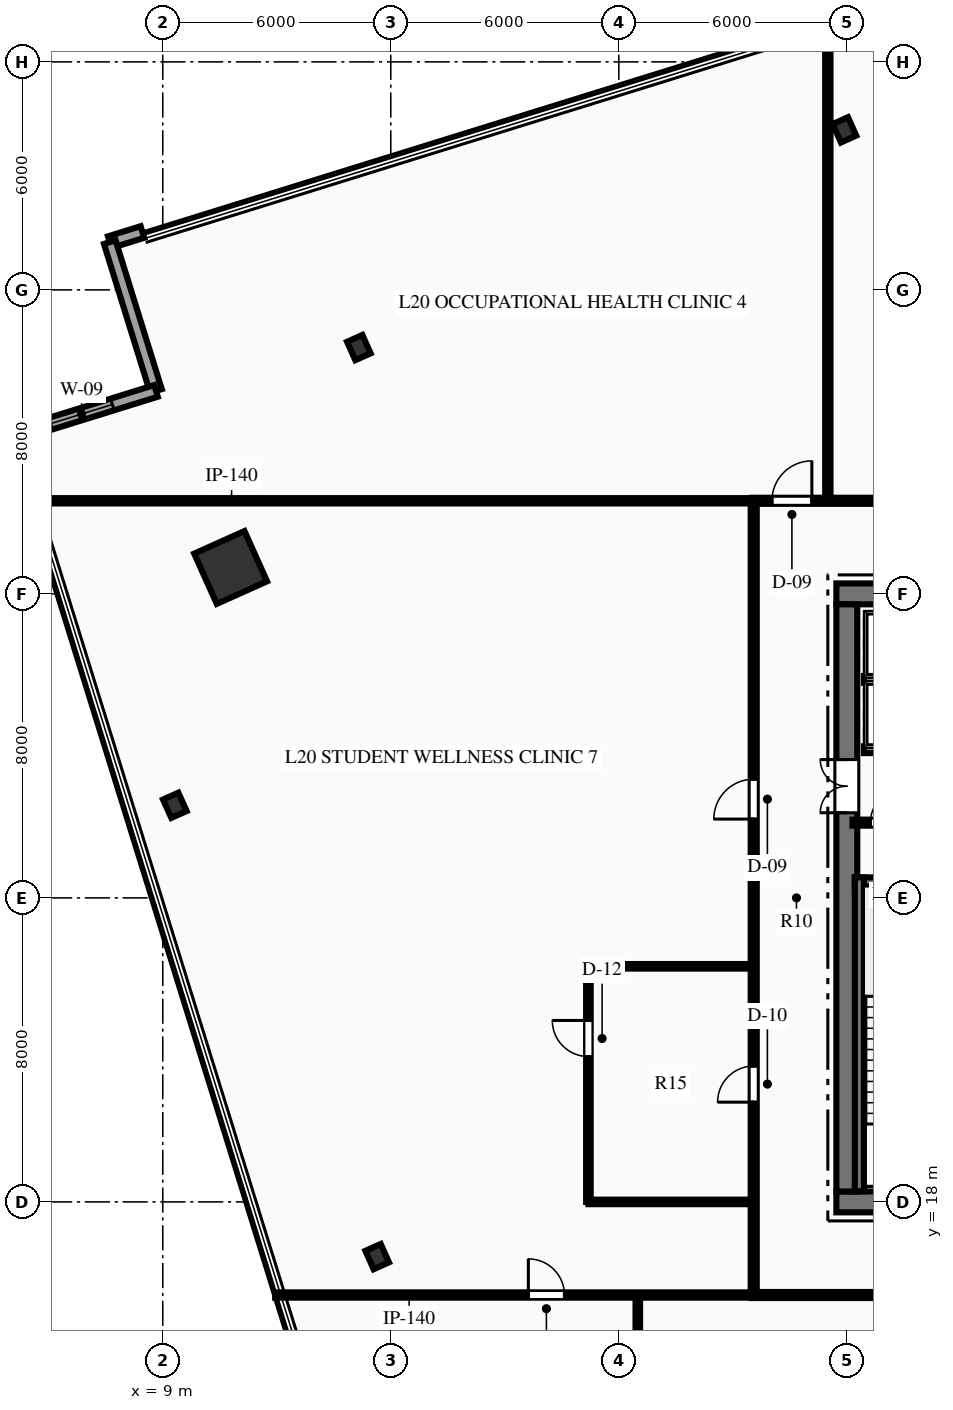
"""IFC4 building model, lengths in metres.
Left out: names, types, materials, properties, quantities, classifications, styles, units other than length and angle.
Written with IfcOpenShell. Run it as: python <this file> out.ifc"""

import sys

from ifc_helpers import new_model, si_unit, direction, frame, frame_2d, origin, origin_2d, place, context, subcontext, project, spatial, rectangle, hollow_rectangle, i_section, extrude, element, fill, save


model = new_model("IFC4")
c1 = context("Model", 3, precision=1e-05, world=origin(), true_north=direction((0.0, 1.0)))
c2 = subcontext(c1, "Body", "Model", "MODEL_VIEW")
j1 = project(units=[si_unit("LENGTHUNIT", "METRE"), si_unit("PLANEANGLEUNIT", "RADIAN")], contexts=[c1])
p1 = place(None, origin())
s1 = spatial("IfcSite", under=j1, at=p1, CompositionType="ELEMENT")
p2 = place(p1, origin())
s2 = spatial("IfcBuilding", under=s1, at=p2, CompositionType="ELEMENT")
p3 = place(p2, frame((0.0, 0.0, 85.95)))
s3 = spatial("IfcBuildingStorey", under=s2, at=p3, CompositionType="ELEMENT", Elevation=85.95)
p4 = place(p3, frame((26.725, 18.0, 0.0), z_axis=(0.0, 0.0, 1.0), x_axis=(1.0, 0.0, 0.0)))
e1 = element("IfcWall", 1, at=p4, inside=s3, PredefinedType="SHEAR", context=c2, shape_type="SweptSolid", body=[
    extrude(rectangle(XDim=18.55, YDim=0.55, at=frame_2d((9.275, 0.0))), origin(), (0.0, 0.0, 1.0), 4.5),
])
p5 = place(p4, frame((7.375, 0.0, 0.0)))
e2 = element("IfcOpeningElement", 2, at=p5, cuts=e1, PredefinedType="OPENING", context=c2, shape_type="SweptSolid", body=[
    extrude(rectangle(XDim=1.1, YDim=2.15, at=frame_2d((0.55, 1.075))), frame((0.0, 0.285, 0.0), z_axis=(0.0, -1.0, 0.0), x_axis=(1.0, 0.0, 0.0)), (0.0, 0.0, 1.0), 0.57),
])
p6 = place(p4, frame((10.075, 0.0, 0.0)))
e3 = element("IfcOpeningElement", 3, at=p6, cuts=e1, PredefinedType="OPENING", context=c2, shape_type="SweptSolid", body=[
    extrude(rectangle(XDim=1.1, YDim=2.15, at=frame_2d((0.55, 1.075))), frame((0.0, 0.285, 0.0), z_axis=(0.0, -1.0, 0.0), x_axis=(1.0, 0.0, 0.0)), (0.0, 0.0, 1.0), 0.57),
])
p7 = place(p3, frame((26.725, 34.0, 0.0), z_axis=(0.0, 0.0, 1.0), x_axis=(1.0, 0.0, 0.0)))
e4 = element("IfcWall", 4, at=p7, inside=s3, PredefinedType="SHEAR", context=c2, shape_type="SweptSolid", body=[
    extrude(rectangle(XDim=18.55, YDim=0.55, at=frame_2d((9.275, 0.0))), origin(), (0.0, 0.0, 1.0), 4.5),
])
p8 = place(p7, frame((1.24, 0.0, 0.0)))
e5 = element("IfcOpeningElement", 5, at=p8, cuts=e4, PredefinedType="OPENING", context=c2, shape_type="SweptSolid", body=[
    extrude(rectangle(XDim=1.1, YDim=2.15, at=frame_2d((0.55, 1.075))), frame((0.0, 0.285, 0.0), z_axis=(0.0, -1.0, 0.0), x_axis=(1.0, 0.0, 0.0)), (0.0, 0.0, 1.0), 0.57),
])
p9 = place(p7, frame((3.49, 0.0, 0.0)))
e6 = element("IfcOpeningElement", 6, at=p9, cuts=e4, PredefinedType="OPENING", context=c2, shape_type="SweptSolid", body=[
    extrude(rectangle(XDim=1.1, YDim=2.15, at=frame_2d((0.55, 1.075))), frame((0.0, 0.285, 0.0), z_axis=(0.0, -1.0, 0.0), x_axis=(1.0, 0.0, 0.0)), (0.0, 0.0, 1.0), 0.57),
])
p10 = place(p7, frame((13.96, 0.0, 0.0)))
e7 = element("IfcOpeningElement", 7, at=p10, cuts=e4, PredefinedType="OPENING", context=c2, shape_type="SweptSolid", body=[
    extrude(rectangle(XDim=1.1, YDim=2.15, at=frame_2d((0.55, 1.075))), frame((0.0, 0.285, 0.0), z_axis=(0.0, -1.0, 0.0), x_axis=(1.0, 0.0, 0.0)), (0.0, 0.0, 1.0), 0.57),
])
p11 = place(p7, frame((16.21, 0.0, 0.0)))
e8 = element("IfcOpeningElement", 8, at=p11, cuts=e4, PredefinedType="OPENING", context=c2, shape_type="SweptSolid", body=[
    extrude(rectangle(XDim=1.1, YDim=2.15, at=frame_2d((0.55, 1.075))), frame((0.0, 0.285, 0.0), z_axis=(0.0, -1.0, 0.0), x_axis=(1.0, 0.0, 0.0)), (0.0, 0.0, 1.0), 0.57),
])
p12 = place(p3, frame((27.0, 18.275, 0.0), z_axis=(0.0, 0.0, 1.0), x_axis=(0.0, 1.0, 0.0)))
e9 = element("IfcWall", 9, at=p12, inside=s3, PredefinedType="SHEAR", context=c2, shape_type="SweptSolid", body=[
    extrude(rectangle(XDim=15.45, YDim=0.55, at=frame_2d((7.725, 0.0))), origin(), (0.0, 0.0, 1.0), 4.5),
])
p13 = place(p12, frame((9.965, 0.0, 0.0)))
e10 = element("IfcOpeningElement", 10, at=p13, cuts=e9, PredefinedType="OPENING", context=c2, shape_type="SweptSolid", body=[
    extrude(rectangle(XDim=1.4, YDim=2.2, at=frame_2d((0.7, 1.1))), frame((0.0, 0.285, 0.0), z_axis=(0.0, -1.0, 0.0), x_axis=(1.0, 0.0, 0.0)), (0.0, 0.0, 1.0), 0.57),
])
p14 = place(p3, frame((27.21, 26.42, 0.0), z_axis=(0.0, 0.0, 1.0), x_axis=(1.0, 0.0, 0.0)))
e11 = element("IfcWall", 11, at=p14, inside=s3, PredefinedType="SHEAR", context=c2, shape_type="SweptSolid", body=[
    extrude(rectangle(XDim=3.98, YDim=0.24, at=frame_2d((1.99, 0.0))), origin(), (0.0, 0.0, 1.0), 4.5),
])
p15 = place(p3, frame((27.33, 18.28, 0.0), z_axis=(0.0, 0.0, 1.0), x_axis=(0.0, 1.0, 0.0)))
e12 = element("IfcWall", 12, at=p15, inside=s3, PredefinedType="SHEAR", context=c2, shape_type="SweptSolid", body=[
    extrude(rectangle(XDim=8.26, YDim=0.24, at=frame_2d((4.13, 0.0))), origin(), (0.0, 0.0, 1.0), 4.5),
])
p16 = place(p3, frame((10.786, 34.695, 0.0), z_axis=(0.0, 0.0, 1.0), x_axis=(0.912477494148, 0.409126902895, 0.0)))
e13 = element("IfcColumn", 13, at=p16, inside=s3, PredefinedType="COLUMN", context=c2, shape_type="SweptSolid", body=[
    extrude(hollow_rectangle(XDim=1.45, YDim=1.45, WallThickness=0.07, at=origin_2d()), origin(), (0.0, 0.0, 1.0), 4.5),
])
for number, where, z_axis, x_axis in (
    (14, (26.938, 46.211, 0.0), (0.0, 0.0, 1.0), (0.912, 0.409, 0.0)),
    (15, (14.159, 40.482, 0.0), (0.0, 0.0, 1.0), (0.912, 0.409, 0.0)),
    (16, (9.318, 28.437, 0.0), (0.0, 0.0, 1.0), (0.912, 0.409, 0.0)),
    (17, (14.643, 16.561, 0.0), (0.0, 0.0, 1.0), (0.912, 0.409, 0.0)),
):
    element("IfcColumn", number, at=place(p3, frame(where, z_axis=z_axis, x_axis=x_axis)), inside=s3, PredefinedType="COLUMN", context=c2, shape_type="SweptSolid", body=[
        extrude(i_section(OverallWidth=0.442, OverallDepth=0.531, WebThickness=0.066, FlangeThickness=0.106, at=origin_2d()), origin(), (0.0, 0.0, 1.0), 4.5),
    ])
p17 = place(p3, frame((7.606, 43.256, 0.0), z_axis=(0.0, 0.0, 1.0), x_axis=(0.955019103262, 0.296544284053, 0.0)))
e18 = element("IfcWall", 18, at=p17, inside=s3, PredefinedType="STANDARD", context=c2, shape_type="SweptSolid", body=[
    extrude(rectangle(XDim=0.9, YDim=0.32, at=frame_2d((0.45, 0.0))), origin(), (0.0, 0.0, 1.0), 4.2),
])
p18 = place(p3, frame((8.822, 39.341, 0.0), z_axis=(0.0, 0.0, 1.0), x_axis=(-0.296545302379, 0.95501878706, 0.0)))
e19 = element("IfcWall", 19, at=p18, inside=s3, PredefinedType="STANDARD", context=c2, shape_type="SweptSolid", body=[
    extrude(rectangle(XDim=4.1, YDim=0.32, at=frame_2d((2.05, 0.0))), origin(), (0.0, 0.0, 1.0), 4.2),
])
p19 = place(p3, frame((4.906, 38.125, 0.0), z_axis=(0.0, 0.0, 1.0), x_axis=(0.95501878706, 0.296545302379, 0.0)))
e20 = element("IfcWall", 20, at=p19, inside=s3, PredefinedType="STANDARD", context=c2, shape_type="SweptSolid", body=[
    extrude(rectangle(XDim=4.1, YDim=0.32, at=frame_2d((2.05, 0.0))), origin(), (0.0, 0.0, 1.0), 4.2),
])
p20 = place(p19, frame((1.2, 0.0, 0.75)))
e21 = element("IfcOpeningElement", 21, at=p20, cuts=e20, PredefinedType="OPENING", context=c2, shape_type="SweptSolid", body=[
    extrude(rectangle(XDim=1.7, YDim=2.5, at=frame_2d((0.85, 1.25))), frame((0.0, 0.17, 0.0), z_axis=(0.0, -1.0, 0.0), x_axis=(1.0, 0.0, 0.0)), (0.0, 0.0, 1.0), 0.34),
])
p21 = place(p3, frame((27.15, 27.98, 0.0), z_axis=(0.0, 0.0, 1.0), x_axis=(1.0, 0.0, 0.0)))
e22 = element("IfcWall", 22, at=p21, inside=s3, PredefinedType="PARTITIONING", context=c2, shape_type="SweptSolid", body=[
    extrude(rectangle(XDim=4.05, YDim=0.16, at=frame_2d((2.025, 0.0))), origin(), (0.0, 0.0, 1.0), 4.2),
])
p22 = place(p21, frame((0.47, 0.0, 0.0)))
e23 = element("IfcOpeningElement", 23, at=p22, cuts=e22, PredefinedType="OPENING", context=c2, shape_type="SweptSolid", body=[
    extrude(rectangle(XDim=0.9, YDim=2.15, at=frame_2d((0.45, 1.075))), frame((0.0, 0.09, 0.0), z_axis=(0.0, -1.0, 0.0), x_axis=(1.0, 0.0, 0.0)), (0.0, 0.0, 1.0), 0.18),
])
p23 = place(p21, frame((2.36, 0.0, 0.0)))
e24 = element("IfcOpeningElement", 24, at=p23, cuts=e22, PredefinedType="OPENING", context=c2, shape_type="SweptSolid", body=[
    extrude(rectangle(XDim=0.9, YDim=2.15, at=frame_2d((0.45, 1.075))), frame((0.0, 0.09, 0.0), z_axis=(0.0, -1.0, 0.0), x_axis=(1.0, 0.0, 0.0)), (0.0, 0.0, 1.0), 0.18),
])
p24 = place(p3, frame((27.45, 29.9, 0.0), z_axis=(0.0, 0.0, 1.0), x_axis=(1.0, 0.0, 0.0)))
e25 = element("IfcWall", 25, at=p24, inside=s3, PredefinedType="PARTITIONING", context=c2, shape_type="SweptSolid", body=[
    extrude(rectangle(XDim=4.43, YDim=0.18, at=frame_2d((2.215, 0.0))), origin(), (0.0, 0.0, 1.0), 4.2),
])
p25 = place(p24, frame((0.515, 0.0, 0.0)))
e26 = element("IfcOpeningElement", 26, at=p25, cuts=e25, PredefinedType="OPENING", context=c2, shape_type="SweptSolid", body=[
    extrude(rectangle(XDim=1.1, YDim=2.15, at=frame_2d((0.55, 1.075))), frame((0.0, 0.1, 0.0), z_axis=(0.0, -1.0, 0.0), x_axis=(1.0, 0.0, 0.0)), (0.0, 0.0, 1.0), 0.2),
])
p26 = place(p24, frame((2.765, 0.0, 0.0)))
e27 = element("IfcOpeningElement", 27, at=p26, cuts=e25, PredefinedType="OPENING", context=c2, shape_type="SweptSolid", body=[
    extrude(rectangle(XDim=1.1, YDim=2.15, at=frame_2d((0.55, 1.075))), frame((0.0, 0.1, 0.0), z_axis=(0.0, -1.0, 0.0), x_axis=(1.0, 0.0, 0.0)), (0.0, 0.0, 1.0), 0.2),
])
p27 = place(p3, frame((27.45, 31.75, 0.0), z_axis=(0.0, 0.0, 1.0), x_axis=(1.0, 0.0, 0.0)))
e28 = element("IfcWall", 28, at=p27, inside=s3, PredefinedType="PARTITIONING", context=c2, shape_type="SweptSolid", body=[
    extrude(rectangle(XDim=4.43, YDim=0.18, at=frame_2d((2.215, 0.0))), origin(), (0.0, 0.0, 1.0), 4.2),
])
p28 = place(p3, frame((24.5, 15.55, 0.0), z_axis=(0.0, 0.0, 1.0), x_axis=(1.0, 0.0, 0.0)))
e29 = element("IfcWall", 29, at=p28, inside=s3, PredefinedType="PARTITIONING", context=c2, shape_type="SweptSolid", body=[
    extrude(rectangle(XDim=23.0, YDim=0.16, at=frame_2d((11.5, 0.0))), origin(), (0.0, 0.0, 1.0), 4.2),
])
p29 = place(p28, frame((16.15, 0.0, 0.0)))
e30 = element("IfcOpeningElement", 30, at=p29, cuts=e29, PredefinedType="OPENING", context=c2, shape_type="SweptSolid", body=[
    extrude(rectangle(XDim=0.9, YDim=2.15, at=frame_2d((0.45, 1.075))), frame((0.0, 0.09, 0.0), z_axis=(0.0, -1.0, 0.0), x_axis=(1.0, 0.0, 0.0)), (0.0, 0.0, 1.0), 0.18),
])
p30 = place(p28, frame((18.45, 0.0, 0.0)))
e31 = element("IfcOpeningElement", 31, at=p30, cuts=e29, PredefinedType="OPENING", context=c2, shape_type="SweptSolid", body=[
    extrude(rectangle(XDim=0.9, YDim=2.15, at=frame_2d((0.45, 1.075))), frame((0.0, 0.09, 0.0), z_axis=(0.0, -1.0, 0.0), x_axis=(1.0, 0.0, 0.0)), (0.0, 0.0, 1.0), 0.18),
])
p31 = place(p28, frame((20.7, 0.0, 0.0)))
e32 = element("IfcOpeningElement", 32, at=p31, cuts=e29, PredefinedType="OPENING", context=c2, shape_type="SweptSolid", body=[
    extrude(rectangle(XDim=1.0, YDim=2.15, at=frame_2d((0.5, 1.075))), frame((0.0, 0.09, 0.0), z_axis=(0.0, -1.0, 0.0), x_axis=(1.0, 0.0, 0.0)), (0.0, 0.0, 1.0), 0.18),
])
p32 = place(p28, frame((3.781, 0.0, 0.0)))
e33 = element("IfcOpeningElement", 33, at=p32, cuts=e29, PredefinedType="OPENING", context=c2, shape_type="SweptSolid", body=[
    extrude(rectangle(XDim=1.05, YDim=2.15, at=frame_2d((0.525, 1.075))), frame((0.0, 0.09, 0.0), z_axis=(0.0, -1.0, 0.0), x_axis=(1.0, 0.0, 0.0)), (0.0, 0.0, 1.0), 0.18),
])
p33 = place(p28, frame((8.373, 0.0, 0.0)))
e34 = element("IfcOpeningElement", 34, at=p33, cuts=e29, PredefinedType="OPENING", context=c2, shape_type="SweptSolid", body=[
    extrude(rectangle(XDim=1.05, YDim=2.15, at=frame_2d((0.525, 1.075))), frame((0.0, 0.09, 0.0), z_axis=(0.0, -1.0, 0.0), x_axis=(1.0, 0.0, 0.0)), (0.0, 0.0, 1.0), 0.18),
])
p34 = place(p3, frame((24.5, 36.45, 0.0), z_axis=(0.0, 0.0, 1.0), x_axis=(1.0, 0.0, 0.0)))
e35 = element("IfcWall", 35, at=p34, inside=s3, PredefinedType="PARTITIONING", context=c2, shape_type="SweptSolid", body=[
    extrude(rectangle(XDim=23.0, YDim=0.16, at=frame_2d((11.5, 0.0))), origin(), (0.0, 0.0, 1.0), 4.2),
])
p35 = place(p34, frame((0.53, 0.0, 0.0)))
e36 = element("IfcOpeningElement", 36, at=p35, cuts=e35, PredefinedType="OPENING", context=c2, shape_type="SweptSolid", body=[
    extrude(rectangle(XDim=1.05, YDim=2.15, at=frame_2d((0.525, 1.075))), frame((0.0, 0.09, 0.0), z_axis=(0.0, -1.0, 0.0), x_axis=(1.0, 0.0, 0.0)), (0.0, 0.0, 1.0), 0.18),
])
p36 = place(p34, frame((9.755, 0.0, 0.0)))
e37 = element("IfcOpeningElement", 37, at=p36, cuts=e35, PredefinedType="OPENING", context=c2, shape_type="SweptSolid", body=[
    extrude(rectangle(XDim=1.05, YDim=2.15, at=frame_2d((0.525, 1.075))), frame((0.0, 0.09, 0.0), z_axis=(0.0, -1.0, 0.0), x_axis=(1.0, 0.0, 0.0)), (0.0, 0.0, 1.0), 0.18),
])
p37 = place(p34, frame((16.129, 0.0, 0.0)))
e38 = element("IfcOpeningElement", 38, at=p37, cuts=e35, PredefinedType="OPENING", context=c2, shape_type="SweptSolid", body=[
    extrude(rectangle(XDim=1.05, YDim=2.15, at=frame_2d((0.525, 1.075))), frame((0.0, 0.09, 0.0), z_axis=(0.0, -1.0, 0.0), x_axis=(1.0, 0.0, 0.0)), (0.0, 0.0, 1.0), 0.18),
])
p38 = place(p3, frame((24.55, 15.55, 0.0), z_axis=(0.0, 0.0, 1.0), x_axis=(0.0, 1.0, 0.0)))
e39 = element("IfcWall", 39, at=p38, inside=s3, PredefinedType="PARTITIONING", context=c2, shape_type="SweptSolid", body=[
    extrude(rectangle(XDim=20.9, YDim=0.16, at=frame_2d((10.45, 0.0))), origin(), (0.0, 0.0, 1.0), 4.2),
])
p39 = place(p38, frame((5.075, 0.0, 0.0)))
e40 = element("IfcOpeningElement", 40, at=p39, cuts=e39, PredefinedType="OPENING", context=c2, shape_type="SweptSolid", body=[
    extrude(rectangle(XDim=0.95, YDim=2.15, at=frame_2d((0.475, 1.075))), frame((0.0, 0.09, 0.0), z_axis=(0.0, -1.0, 0.0), x_axis=(1.0, 0.0, 0.0)), (0.0, 0.0, 1.0), 0.18),
])
p40 = place(p38, frame((12.524, 0.0, 0.0)))
e41 = element("IfcOpeningElement", 41, at=p40, cuts=e39, PredefinedType="OPENING", context=c2, shape_type="SweptSolid", body=[
    extrude(rectangle(XDim=1.05, YDim=2.15, at=frame_2d((0.525, 1.075))), frame((0.0, 0.09, 0.0), z_axis=(0.0, -1.0, 0.0), x_axis=(1.0, 0.0, 0.0)), (0.0, 0.0, 1.0), 0.18),
])
p41 = place(p3, frame((11.958, 15.55, 0.0), z_axis=(0.0, 0.0, 1.0), x_axis=(1.0, 0.0, 0.0)))
e42 = element("IfcWall", 42, at=p41, inside=s3, PredefinedType="PARTITIONING", context=c2, shape_type="SweptSolid", body=[
    extrude(rectangle(XDim=12.593, YDim=0.14, at=frame_2d((6.296, 0.0))), origin(), (0.0, 0.0, 1.0), 4.2),
])
p42 = place(p41, frame((6.663, 0.0, 0.0)))
e43 = element("IfcOpeningElement", 43, at=p42, cuts=e42, PredefinedType="OPENING", context=c2, shape_type="SweptSolid", body=[
    extrude(rectangle(XDim=0.95, YDim=2.15, at=frame_2d((0.475, 1.075))), frame((0.0, 0.08, 0.0), z_axis=(0.0, -1.0, 0.0), x_axis=(1.0, 0.0, 0.0)), (0.0, 0.0, 1.0), 0.16),
])
p43 = place(p3, frame((5.468, 36.45, 0.0), z_axis=(0.0, 0.0, 1.0), x_axis=(1.0, 0.0, 0.0)))
e44 = element("IfcWall", 44, at=p43, inside=s3, PredefinedType="PARTITIONING", context=c2, shape_type="SweptSolid", body=[
    extrude(rectangle(XDim=19.082, YDim=0.14, at=frame_2d((9.541, 0.0))), origin(), (0.0, 0.0, 1.0), 4.2),
])
p44 = place(p3, frame((21.5, -1.356, 0.0), z_axis=(0.0, 0.0, 1.0), x_axis=(0.0, 1.0, 0.0)))
e45 = element("IfcWall", 45, at=p44, inside=s3, PredefinedType="PARTITIONING", context=c2, shape_type="SweptSolid", body=[
    extrude(rectangle(XDim=16.906, YDim=0.12, at=frame_2d((8.453, 0.0))), origin(), (0.0, 0.0, 1.0), 4.2),
])
p45 = place(p3, frame((26.5, 36.45, 0.0), z_axis=(0.0, 0.0, 1.0), x_axis=(0.0, 1.0, 0.0)))
e46 = element("IfcWall", 46, at=p45, inside=s3, PredefinedType="PARTITIONING", context=c2, shape_type="SweptSolid", body=[
    extrude(rectangle(XDim=12.631, YDim=0.14, at=frame_2d((6.315, 0.0))), origin(), (0.0, 0.0, 1.0), 4.2),
])
p46 = place(p3, frame((20.2, 18.0, 0.0), z_axis=(0.0, 0.0, 1.0), x_axis=(1.0, 0.0, 0.0)))
e47 = element("IfcWall", 47, at=p46, inside=s3, PredefinedType="PARTITIONING", context=c2, shape_type="SweptSolid", body=[
    extrude(rectangle(XDim=4.35, YDim=0.12, at=frame_2d((2.175, 0.0))), origin(), (0.0, 0.0, 1.0), 3.499),
])
p47 = place(p3, frame((20.2, 18.0, 0.0), z_axis=(0.0, 0.0, 1.0), x_axis=(0.0, 1.0, 0.0)))
e48 = element("IfcWall", 48, at=p47, inside=s3, PredefinedType="PARTITIONING", context=c2, shape_type="SweptSolid", body=[
    extrude(rectangle(XDim=6.2, YDim=0.12, at=frame_2d((3.1, 0.0))), origin(), (0.0, 0.0, 1.0), 4.2),
])
p48 = place(p47, frame((3.825, 0.0, 0.0)))
e49 = element("IfcOpeningElement", 49, at=p48, cuts=e48, PredefinedType="OPENING", context=c2, shape_type="SweptSolid", body=[
    extrude(rectangle(XDim=0.95, YDim=2.15, at=frame_2d((0.475, 1.075))), frame((0.0, 0.07, 0.0), z_axis=(0.0, -1.0, 0.0), x_axis=(1.0, 0.0, 0.0)), (0.0, 0.0, 1.0), 0.14),
])
p49 = place(p3, frame((20.2, 24.2, 0.0), z_axis=(0.0, 0.0, 1.0), x_axis=(1.0, 0.0, 0.0)))
e50 = element("IfcWall", 50, at=p49, inside=s3, PredefinedType="PARTITIONING", context=c2, shape_type="SweptSolid", body=[
    extrude(rectangle(XDim=4.35, YDim=0.12, at=frame_2d((2.175, 0.0))), origin(), (0.0, 0.0, 1.0), 4.2),
])
p50 = place(p20, origin())
e51 = element("IfcWindow", 51, at=p50, inside=s3, PartitioningType="SINGLE_PANEL", PredefinedType="WINDOW", context=c2, shape_type="SweptSolid", body=[
    extrude(rectangle(XDim=1.7, YDim=2.5, at=frame_2d((0.85, 1.25))), frame((0.0, 0.03, 0.0), z_axis=(0.0, -1.0, 0.0), x_axis=(1.0, 0.0, 0.0)), (0.0, 0.0, 1.0), 0.06),
])
fill(e21, e51)
p51 = place(p22, origin())
e52 = element("IfcDoor", 52, at=p51, inside=s3, OperationType="SINGLE_SWING_RIGHT", PredefinedType="DOOR", context=c2, shape_type="SweptSolid", body=[
    extrude(rectangle(XDim=0.9, YDim=2.15, at=frame_2d((0.45, 1.075))), frame((0.0, 0.025, 0.0), z_axis=(0.0, -1.0, 0.0), x_axis=(1.0, 0.0, 0.0)), (0.0, 0.0, 1.0), 0.05),
])
fill(e23, e52)
p52 = place(p13, origin())
e53 = element("IfcDoor", 53, at=p52, inside=s3, OperationType="DOUBLE_DOOR_SINGLE_SWING", PredefinedType="DOOR", context=c2, shape_type="SweptSolid", body=[
    extrude(rectangle(XDim=1.4, YDim=2.2, at=frame_2d((0.7, 1.1))), frame((0.0, 0.025, 0.0), z_axis=(0.0, -1.0, 0.0), x_axis=(1.0, 0.0, 0.0)), (0.0, 0.0, 1.0), 0.05),
])
fill(e10, e53)
p53 = place(p39, origin())
e54 = element("IfcDoor", 54, at=p53, inside=s3, OperationType="SINGLE_SWING_LEFT", PredefinedType="DOOR", context=c2, shape_type="SweptSolid", body=[
    extrude(rectangle(XDim=0.95, YDim=2.15, at=frame_2d((0.475, 1.075))), frame((0.0, 0.025, 0.0), z_axis=(0.0, -1.0, 0.0), x_axis=(1.0, 0.0, 0.0)), (0.0, 0.0, 1.0), 0.05),
])
fill(e40, e54)
p54 = place(p48, origin())
e55 = element("IfcDoor", 55, at=p54, inside=s3, OperationType="SINGLE_SWING_RIGHT", PredefinedType="DOOR", context=c2, shape_type="SweptSolid", body=[
    extrude(rectangle(XDim=0.95, YDim=2.15, at=frame_2d((0.475, 1.075))), frame((0.0, 0.025, 0.0), z_axis=(0.0, -1.0, 0.0), x_axis=(1.0, 0.0, 0.0)), (0.0, 0.0, 1.0), 0.05),
])
fill(e49, e55)
p55 = place(p42, origin())
e56 = element("IfcDoor", 56, at=p55, inside=s3, OperationType="SINGLE_SWING_LEFT", PredefinedType="DOOR", context=c2, shape_type="SweptSolid", body=[
    extrude(rectangle(XDim=0.95, YDim=2.15, at=frame_2d((0.475, 1.075))), frame((0.0, 0.025, 0.0), z_axis=(0.0, -1.0, 0.0), x_axis=(1.0, 0.0, 0.0)), (0.0, 0.0, 1.0), 0.05),
])
fill(e43, e56)
p56 = place(p35, origin())
e57 = element("IfcDoor", 57, at=p56, inside=s3, OperationType="SINGLE_SWING_RIGHT", PredefinedType="DOOR", context=c2, shape_type="SweptSolid", body=[
    extrude(rectangle(XDim=1.05, YDim=2.15, at=frame_2d((0.525, 1.075))), frame((0.0, 0.025, 0.0), z_axis=(0.0, -1.0, 0.0), x_axis=(1.0, 0.0, 0.0)), (0.0, 0.0, 1.0), 0.05),
])
fill(e36, e57)
p57 = place(p40, origin())
e58 = element("IfcDoor", 58, at=p57, inside=s3, OperationType="SINGLE_SWING_LEFT", PredefinedType="DOOR", context=c2, shape_type="SweptSolid", body=[
    extrude(rectangle(XDim=1.05, YDim=2.15, at=frame_2d((0.525, 1.075))), frame((0.0, 0.025, 0.0), z_axis=(0.0, -1.0, 0.0), x_axis=(1.0, 0.0, 0.0)), (0.0, 0.0, 1.0), 0.05),
])
fill(e41, e58)
save(model, sys.argv[1])
